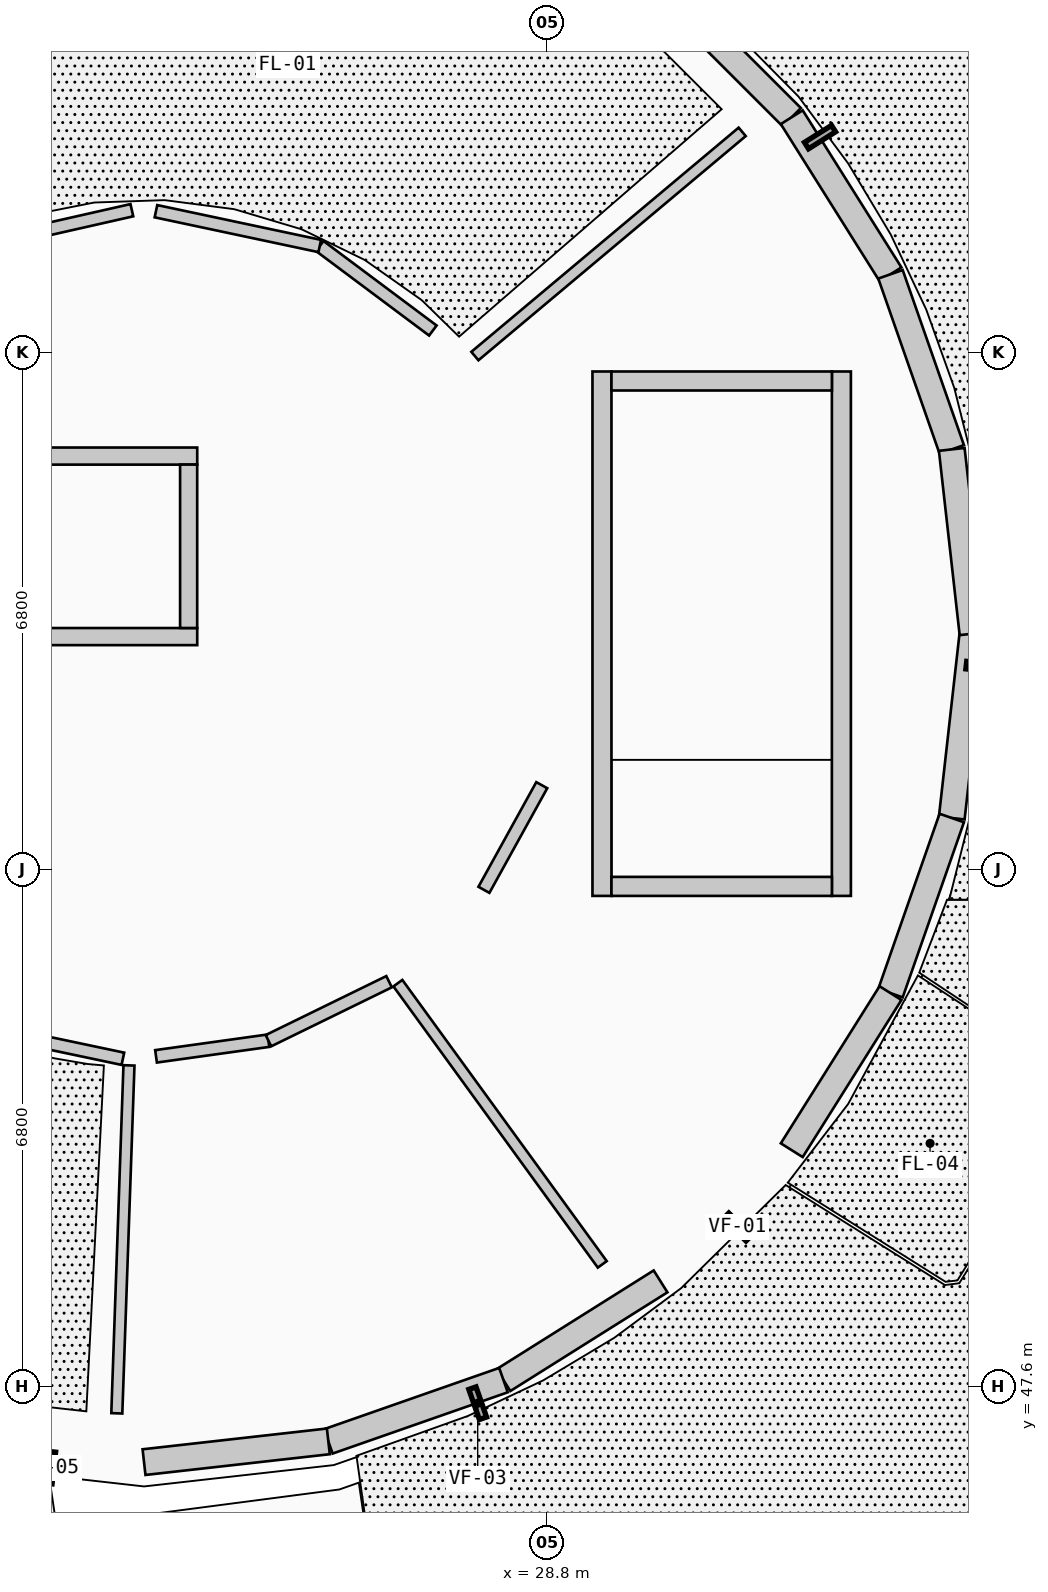
"""IFC4 building model, lengths in metres.
Left out: names, types, materials, properties, quantities, classifications, styles, units other than length and angle.
Written with IfcOpenShell. Run it as: python <this file> out.ifc"""

import sys

from ifc_helpers import new_model, si_unit, direction, frame, frame_2d, origin, origin_2d, place, context, subcontext, project, spatial, rectangle, circle, extrude, element, fill, save


model = new_model("IFC4")
c1 = context("Model", 3, precision=1e-05, world=origin(), true_north=direction((0.0, 1.0)))
c2 = subcontext(c1, "Body", "Model", "MODEL_VIEW")
j1 = project(units=[si_unit("LENGTHUNIT", "METRE"), si_unit("PLANEANGLEUNIT", "RADIAN")], contexts=[c1])
p1 = place(None, origin())
s1 = spatial("IfcSite", under=j1, at=p1, CompositionType="ELEMENT")
p2 = place(p1, origin())
s2 = spatial("IfcBuilding", under=s1, at=p2, CompositionType="ELEMENT")
p3 = place(p2, origin())
s3 = spatial("IfcBuildingStorey", under=s2, at=p3, CompositionType="ELEMENT", Elevation=0.0)
for number, where, z_axis, x_axis in (
    (1, (33.88, 57.5, 0.0), (0.0, 0.0, 1.0), (1.0, 0.0, 0.0)),
    (2, (32.852, 62.004, 0.0), (0.0, 0.0, 1.0), (1.0, 0.0, 0.0)),
    (3, (25.81, 47.38, 0.0), (0.0, 0.0, 1.0), (1.0, 0.0, 0.0)),
    (4, (29.972, 49.385, 0.0), (0.0, 0.0, 1.0), (1.0, 0.0, 0.0)),
    (5, (32.852, 52.996, 0.0), (0.0, 0.0, 1.0), (1.0, 0.0, 0.0)),
):
    element("IfcColumn", number, at=place(p3, frame(where, z_axis=z_axis, x_axis=x_axis)), inside=s3, PredefinedType="PILASTER", context=c2, shape_type="SweptSolid", body=[
        extrude(circle(Radius=0.275, at=origin_2d()), origin(), (0.0, 0.0, 1.0), 4.55),
    ])
for number, where, z_axis, x_axis in (
    (6, (27.46, 61.46, 0.0), (0.0, 0.0, 1.0), (1.0, 0.0, 0.0)),
    (7, (23.5, 63.1, 0.0), (0.0, 0.0, 1.0), (1.0, 0.0, 0.0)),
    (8, (23.5, 51.9, 0.0), (0.0, 0.0, 1.0), (1.0, 0.0, 0.0)),
    (9, (27.46, 53.54, 0.0), (0.0, 0.0, 1.0), (1.0, 0.0, 0.0)),
):
    element("IfcColumn", number, at=place(p3, frame(where, z_axis=z_axis, x_axis=x_axis)), inside=s3, PredefinedType="COLUMN", context=c2, shape_type="SweptSolid", body=[
        extrude(rectangle(XDim=0.315, YDim=0.315, at=origin_2d()), origin(), (0.0, 0.0, 1.0), 4.55),
    ])
p4 = place(p3, frame((26.15, 46.154, 0.0), z_axis=(0.0, 0.0, 1.0), x_axis=(1.0, 0.0, 0.0)))
e10 = element("IfcColumn", 10, at=p4, inside=s3, PredefinedType="PILASTER", context=c2, shape_type="SweptSolid", body=[
    extrude(circle(Radius=0.275, at=origin_2d()), origin(), (0.0, 0.0, 1.0), 4.55),
])
p5 = place(p3, frame((31.387, 47.61, 1.15), z_axis=(0.0, 0.0, 1.0), x_axis=(1.0, 0.0, 0.0)))
e11 = element("IfcColumn", 11, at=p5, inside=s3, PredefinedType="PILASTER", context=c2, shape_type="SweptSolid", body=[
    extrude(circle(Radius=0.19, at=origin_2d()), origin(), (0.0, 0.0, 1.0), 3.4),
])
p6 = place(p3, frame((34.4, 57.5, 0.0), z_axis=(0.0, 0.0, 1.0), x_axis=(-0.111847873866, -0.993725340882, 0.0)))
e12 = element("IfcWall", 12, at=p6, inside=s3, PredefinedType="SOLIDWALL", context=c2, shape_type="SweptSolid", body=[
    extrude(rectangle(XDim=2.44, YDim=0.34, at=frame_2d((1.22, 0.0))), origin(), (0.0, 0.0, 1.0), 3.659),
])
p7 = place(p3, frame((34.127, 55.075, 0.0), z_axis=(0.0, 0.0, 1.0), x_axis=(-0.330176659411, -0.943919156274, 0.0)))
e13 = element("IfcWall", 13, at=p7, inside=s3, PredefinedType="SOLIDWALL", context=c2, shape_type="SweptSolid", body=[
    extrude(rectangle(XDim=2.441, YDim=0.34, at=frame_2d((1.22, 0.0))), origin(), (0.0, 0.0, 1.0), 3.659),
])
p8 = place(p3, frame((33.321, 52.771, 0.0), z_axis=(0.0, 0.0, 1.0), x_axis=(-0.532136726684, -0.846658434148, 0.0)))
e14 = element("IfcWall", 14, at=p8, inside=s3, PredefinedType="SOLIDWALL", context=c2, shape_type="SweptSolid", body=[
    extrude(rectangle(XDim=2.441, YDim=0.34, at=frame_2d((1.221, 0.0))), origin(), (0.0, 0.0, 1.0), 3.659),
])
p9 = place(p8, frame((0.521, 0.0, 0.0)))
e15 = element("IfcOpeningElement", 15, at=p9, cuts=e14, PredefinedType="OPENING", context=c2, shape_type="SweptSolid", body=[
    extrude(rectangle(XDim=1.4, YDim=2.3, at=frame_2d((0.7, 1.15))), frame((0.0, 0.18, 0.0), z_axis=(0.0, -1.0, 0.0), x_axis=(1.0, 0.0, 0.0)), (0.0, 0.0, 1.0), 0.36),
])
p10 = place(p3, frame((30.296, 48.978, 0.0), z_axis=(0.0, 0.0, 1.0), x_axis=(-0.846658434148, -0.532136726684, 0.0)))
e16 = element("IfcWall", 16, at=p10, inside=s3, PredefinedType="SOLIDWALL", context=c2, shape_type="SweptSolid", body=[
    extrude(rectangle(XDim=2.441, YDim=0.34, at=frame_2d((1.221, 0.0))), origin(), (0.0, 0.0, 1.0), 3.659),
])
p11 = place(p3, frame((28.229, 47.679, 0.0), z_axis=(0.0, 0.0, 1.0), x_axis=(-0.943919156274, -0.330176659411, 0.0)))
e17 = element("IfcWall", 17, at=p11, inside=s3, PredefinedType="SOLIDWALL", context=c2, shape_type="SweptSolid", body=[
    extrude(rectangle(XDim=2.441, YDim=0.34, at=frame_2d((1.22, 0.0))), origin(), (0.0, 0.0, 1.0), 3.659),
])
p12 = place(p3, frame((25.925, 46.873, 0.0), z_axis=(0.0, 0.0, 1.0), x_axis=(-0.993725340882, -0.111847873866, 0.0)))
e18 = element("IfcWall", 18, at=p12, inside=s3, PredefinedType="SOLIDWALL", context=c2, shape_type="SweptSolid", body=[
    extrude(rectangle(XDim=2.44, YDim=0.34, at=frame_2d((1.22, 0.0))), origin(), (0.0, 0.0, 1.0), 3.659),
])
p13 = place(p3, frame((30.296, 66.022, 0.0), z_axis=(0.0, 0.0, 1.0), x_axis=(0.707106781187, -0.707106781187, 0.0)))
e19 = element("IfcWall", 19, at=p13, inside=s3, PredefinedType="SOLIDWALL", context=c2, shape_type="SweptSolid", body=[
    extrude(rectangle(XDim=2.441, YDim=0.34, at=frame_2d((1.22, 0.0))), origin(), (0.0, 0.0, 1.0), 3.659),
])
p14 = place(p3, frame((32.022, 64.296, 0.0), z_axis=(0.0, 0.0, 1.0), x_axis=(0.532136726684, -0.846658434148, 0.0)))
e20 = element("IfcWall", 20, at=p14, inside=s3, PredefinedType="SOLIDWALL", context=c2, shape_type="SweptSolid", body=[
    extrude(rectangle(XDim=2.441, YDim=0.34, at=frame_2d((1.221, 0.0))), origin(), (0.0, 0.0, 1.0), 3.659),
])
p15 = place(p3, frame((33.321, 62.229, 0.0), z_axis=(0.0, 0.0, 1.0), x_axis=(0.330176659411, -0.943919156274, 0.0)))
e21 = element("IfcWall", 21, at=p15, inside=s3, PredefinedType="SOLIDWALL", context=c2, shape_type="SweptSolid", body=[
    extrude(rectangle(XDim=2.441, YDim=0.34, at=frame_2d((1.22, 0.0))), origin(), (0.0, 0.0, 1.0), 3.659),
])
p16 = place(p3, frame((34.127, 59.925, 0.0), z_axis=(0.0, 0.0, 1.0), x_axis=(0.111847873866, -0.993725340882, 0.0)))
e22 = element("IfcWall", 22, at=p16, inside=s3, PredefinedType="SOLIDWALL", context=c2, shape_type="SweptSolid", body=[
    extrude(rectangle(XDim=2.44, YDim=0.34, at=frame_2d((1.22, 0.0))), origin(), (0.0, 0.0, 1.0), 3.659),
])
p17 = place(p2, frame((0.0, 0.0, -4.55)))
s4 = spatial("IfcBuildingStorey", under=s2, at=p17, CompositionType="ELEMENT", Elevation=-4.55)
p18 = place(p17, frame((33.906, 54.0, 0.0), z_axis=(0.0, 0.0, 1.0), x_axis=(1.0, 0.0, 0.0)))
e23 = element("IfcWall", 23, at=p18, inside=s4, PredefinedType="USERDEFINED", context=c2, shape_type="SweptSolid", body=[
    extrude(rectangle(XDim=5.27, YDim=0.4, at=frame_2d((2.635, 0.0))), origin(), (0.0, 0.0, 1.0), 6.68),
])
p19 = place(p3, frame((29.525, 60.95, 0.0), z_axis=(0.0, 0.0, 1.0), x_axis=(0.0, -1.0, 0.0)))
e24 = element("IfcWall", 24, at=p19, inside=s3, PredefinedType="SHEAR", context=c2, shape_type="SweptSolid", body=[
    extrude(rectangle(XDim=6.9, YDim=0.25, at=frame_2d((3.45, 0.0))), origin(), (0.0, 0.0, 1.0), 4.305),
])
p20 = place(p19, frame((0.43, 0.0, 0.0)))
e25 = element("IfcOpeningElement", 25, at=p20, cuts=e24, PredefinedType="OPENING", context=c2, shape_type="SweptSolid", body=[
    extrude(rectangle(XDim=1.1, YDim=2.15, at=frame_2d((0.55, 1.075))), frame((0.0, 0.135, 0.0), z_axis=(0.0, -1.0, 0.0), x_axis=(1.0, 0.0, 0.0)), (0.0, 0.0, 1.0), 0.27),
])
p21 = place(p3, frame((32.675, 60.95, 0.0), z_axis=(0.0, 0.0, 1.0), x_axis=(0.0, -1.0, 0.0)))
e26 = element("IfcWall", 26, at=p21, inside=s3, PredefinedType="SHEAR", context=c2, shape_type="SweptSolid", body=[
    extrude(rectangle(XDim=6.9, YDim=0.25, at=frame_2d((3.45, 0.0))), origin(), (0.0, 0.0, 1.0), 4.305),
])
for number, where, z_axis, x_axis in (
    (27, (29.65, 60.825, 0.0), (0.0, 0.0, 1.0), (1.0, 0.0, 0.0)),
    (28, (29.65, 54.175, 0.0), (0.0, 0.0, 1.0), (1.0, 0.0, 0.0)),
):
    element("IfcWall", number, at=place(p3, frame(where, z_axis=z_axis, x_axis=x_axis)), inside=s3, PredefinedType="SHEAR", context=c2, shape_type="SweptSolid", body=[
        extrude(rectangle(XDim=2.9, YDim=0.25, at=frame_2d((1.45, 0.0))), origin(), (0.0, 0.0, 1.0), 4.305),
    ])
p22 = place(p3, frame((21.1, 57.462, 0.0), z_axis=(0.0, 0.0, 1.0), x_axis=(1.0, 0.0, 0.0)))
e29 = element("IfcWall", 29, at=p22, inside=s3, PredefinedType="SHEAR", context=c2, shape_type="SweptSolid", body=[
    extrude(rectangle(XDim=3.1, YDim=0.225, at=frame_2d((1.55, 0.0))), origin(), (0.0, 0.0, 1.0), 4.305),
])
p23 = place(p22, frame((0.95, 0.0, 0.0)))
e30 = element("IfcOpeningElement", 30, at=p23, cuts=e29, PredefinedType="OPENING", context=c2, shape_type="SweptSolid", body=[
    extrude(rectangle(XDim=1.2, YDim=2.2, at=frame_2d((0.6, 1.1))), frame((0.0, 0.123, 0.0), z_axis=(0.0, -1.0, 0.0), x_axis=(1.0, 0.0, 0.0)), (0.0, 0.0, 1.0), 0.245),
])
p24 = place(p3, frame((21.1, 59.837, 0.0), z_axis=(0.0, 0.0, 1.0), x_axis=(1.0, 0.0, 0.0)))
e31 = element("IfcWall", 31, at=p24, inside=s3, PredefinedType="SHEAR", context=c2, shape_type="SweptSolid", body=[
    extrude(rectangle(XDim=3.1, YDim=0.225, at=frame_2d((1.55, 0.0))), origin(), (0.0, 0.0, 1.0), 4.305),
])
p25 = place(p3, frame((24.087, 57.575, 0.0), z_axis=(0.0, 0.0, 1.0), x_axis=(0.0, 1.0, 0.0)))
e32 = element("IfcWall", 32, at=p25, inside=s3, PredefinedType="SHEAR", context=c2, shape_type="SweptSolid", body=[
    extrude(rectangle(XDim=2.15, YDim=0.225, at=frame_2d((1.075, 0.0))), origin(), (0.0, 0.0, 1.0), 4.305),
])
p26 = place(p3, frame((27.853, 61.153, 0.0), z_axis=(0.0, 0.0, 1.0), x_axis=(0.766177182771, 0.64262938355, 0.0)))
e33 = element("IfcWall", 33, at=p26, inside=s3, PredefinedType="PARTITIONING", context=c2, shape_type="SweptSolid", body=[
    extrude(rectangle(XDim=4.59, YDim=0.145, at=frame_2d((2.295, 0.0))), origin(), (0.0, 0.0, 1.0), 3.634),
])
p27 = place(p3, frame((23.302, 51.82, 0.0), z_axis=(0.0, 0.0, 1.0), x_axis=(-0.034908318573, -0.999390518914, 0.0)))
e34 = element("IfcWall", 34, at=p27, inside=s3, PredefinedType="PARTITIONING", context=c2, shape_type="SweptSolid", body=[
    extrude(rectangle(XDim=4.581, YDim=0.145, at=frame_2d((2.291, 0.0))), origin(), (0.0, 0.0, 1.0), 3.634),
])
p28 = place(p3, frame((26.84, 52.902, 0.0), z_axis=(0.0, 0.0, 1.0), x_axis=(0.587873334136, -0.808952991843, 0.0)))
e35 = element("IfcWall", 35, at=p28, inside=s3, PredefinedType="PARTITIONING", context=c2, shape_type="SweptSolid", body=[
    extrude(rectangle(XDim=4.574, YDim=0.145, at=frame_2d((2.287, 0.0))), origin(), (0.0, 0.0, 1.0), 3.634),
])
p29 = place(p3, frame((27.3, 61.489, 0.0), z_axis=(0.0, 0.0, 1.0), x_axis=(-0.801023932766, 0.598632323831, 0.0)))
e36 = element("IfcWall", 36, at=p29, inside=s3, PredefinedType="PARTITIONING", context=c2, shape_type="SweptSolid", body=[
    extrude(rectangle(XDim=1.858, YDim=0.165, at=frame_2d((0.929, 0.0))), origin(), (0.0, 0.0, 1.0), 3.634),
])
p30 = place(p29, frame((0.289, 0.0, 0.0)))
e37 = element("IfcOpeningElement", 37, at=p30, cuts=e36, PredefinedType="OPENING", context=c2, shape_type="SweptSolid", body=[
    extrude(rectangle(XDim=1.28, YDim=2.3, at=frame_2d((0.64, 1.15))), frame((0.0, 0.093, 0.0), z_axis=(0.0, -1.0, 0.0), x_axis=(1.0, 0.0, 0.0)), (0.0, 0.0, 1.0), 0.185),
])
p31 = place(p3, frame((25.812, 62.601, 0.0), z_axis=(0.0, 0.0, 1.0), x_axis=(-0.978152936259, 0.207886587563, 0.0)))
e38 = element("IfcWall", 38, at=p31, inside=s3, PredefinedType="PARTITIONING", context=c2, shape_type="SweptSolid", body=[
    extrude(rectangle(XDim=2.203, YDim=0.165, at=frame_2d((1.102, 0.0))), origin(), (0.0, 0.0, 1.0), 3.634),
])
p32 = place(p3, frame((23.34, 63.072, 0.0), z_axis=(0.0, 0.0, 1.0), x_axis=(-0.975285396453, -0.2209488526, 0.0)))
e39 = element("IfcWall", 39, at=p32, inside=s3, PredefinedType="PARTITIONING", context=c2, shape_type="SweptSolid", body=[
    extrude(rectangle(XDim=2.276, YDim=0.165, at=frame_2d((1.138, 0.0))), origin(), (0.0, 0.0, 1.0), 3.634),
])
p33 = place(p3, frame((21.493, 52.272, 0.0), z_axis=(0.0, 0.0, 1.0), x_axis=(0.978436766116, -0.206546592113, 0.0)))
e40 = element("IfcWall", 40, at=p33, inside=s3, PredefinedType="PARTITIONING", context=c2, shape_type="SweptSolid", body=[
    extrude(rectangle(XDim=1.767, YDim=0.165, at=frame_2d((0.884, 0.0))), origin(), (0.0, 0.0, 1.0), 3.634),
])
p34 = place(p3, frame((23.658, 51.939, 0.0), z_axis=(0.0, 0.0, 1.0), x_axis=(0.99043401567, 0.137987175508, 0.0)))
e41 = element("IfcWall", 41, at=p34, inside=s3, PredefinedType="PARTITIONING", context=c2, shape_type="SweptSolid", body=[
    extrude(rectangle(XDim=1.493, YDim=0.165, at=frame_2d((0.747, 0.0))), origin(), (0.0, 0.0, 1.0), 3.634),
])
p35 = place(p34, frame((0.247, 0.0, 0.0)))
e42 = element("IfcOpeningElement", 42, at=p35, cuts=e41, PredefinedType="OPENING", context=c2, shape_type="SweptSolid", body=[
    extrude(rectangle(XDim=1.0, YDim=2.14, at=frame_2d((0.5, 1.07))), frame((0.0, 0.093, 0.0), z_axis=(0.0, -1.0, 0.0), x_axis=(1.0, 0.0, 0.0)), (0.0, 0.0, 1.0), 0.185),
])
p36 = place(p3, frame((25.137, 52.145, 0.0), z_axis=(0.0, 0.0, 1.0), x_axis=(0.898398901361, 0.439180388944, 0.0)))
e43 = element("IfcWall", 43, at=p36, inside=s3, PredefinedType="PARTITIONING", context=c2, shape_type="SweptSolid", body=[
    extrude(rectangle(XDim=1.767, YDim=0.165, at=frame_2d((0.883, 0.0))), origin(), (0.0, 0.0, 1.0), 3.634),
])
p37 = place(p3, frame((27.972, 54.13, 0.0), z_axis=(0.0, 0.0, 1.0), x_axis=(0.483639192056, 0.875267463069, 0.0)))
e44 = element("IfcWall", 44, at=p37, inside=s3, PredefinedType="PARTITIONING", context=c2, shape_type="SweptSolid", body=[
    extrude(rectangle(XDim=1.573, YDim=0.165, at=frame_2d((0.787, 0.0))), origin(), (0.0, 0.0, 1.0), 3.634),
])
p38 = place(p37, frame((0.267, 0.0, 0.0)))
e45 = element("IfcOpeningElement", 45, at=p38, cuts=e44, PredefinedType="OPENING", context=c2, shape_type="SweptSolid", body=[
    extrude(rectangle(XDim=1.04, YDim=2.14, at=frame_2d((0.52, 1.07))), frame((0.0, 0.093, 0.0), z_axis=(0.0, -1.0, 0.0), x_axis=(1.0, 0.0, 0.0)), (0.0, 0.0, 1.0), 0.185),
])
p39 = place(p9, origin())
e46 = element("IfcDoor", 46, at=p39, inside=s3, OperationType="SINGLE_SWING_LEFT", PredefinedType="DOOR", context=c2, shape_type="SweptSolid", body=[
    extrude(rectangle(XDim=1.4, YDim=2.3, at=frame_2d((0.7, 1.15))), frame((0.0, 0.025, 0.0), z_axis=(0.0, -1.0, 0.0), x_axis=(1.0, 0.0, 0.0)), (0.0, 0.0, 1.0), 0.05),
])
fill(e15, e46)
p40 = place(p20, origin())
e47 = element("IfcDoor", 47, at=p40, inside=s3, OperationType="SINGLE_SWING_RIGHT", PredefinedType="DOOR", context=c2, shape_type="SweptSolid", body=[
    extrude(rectangle(XDim=1.1, YDim=2.15, at=frame_2d((0.55, 1.075))), frame((0.0, 0.025, 0.0), z_axis=(0.0, -1.0, 0.0), x_axis=(1.0, 0.0, 0.0)), (0.0, 0.0, 1.0), 0.05),
])
fill(e25, e47)
p41 = place(p23, origin())
e48 = element("IfcDoor", 48, at=p41, inside=s3, OperationType="DOUBLE_DOOR_SLIDING", PredefinedType="DOOR", context=c2, shape_type="SweptSolid", body=[
    extrude(rectangle(XDim=1.2, YDim=2.2, at=frame_2d((0.6, 1.1))), frame((0.0, 0.025, 0.0), z_axis=(0.0, -1.0, 0.0), x_axis=(1.0, 0.0, 0.0)), (0.0, 0.0, 1.0), 0.05),
])
fill(e30, e48)
p42 = place(p30, origin())
e49 = element("IfcDoor", 49, at=p42, inside=s3, OperationType="SINGLE_SWING_LEFT", PredefinedType="DOOR", context=c2, shape_type="SweptSolid", body=[
    extrude(rectangle(XDim=1.28, YDim=2.3, at=frame_2d((0.64, 1.15))), frame((0.0, 0.025, 0.0), z_axis=(0.0, -1.0, 0.0), x_axis=(1.0, 0.0, 0.0)), (0.0, 0.0, 1.0), 0.05),
])
fill(e37, e49)
p43 = place(p35, origin())
e50 = element("IfcDoor", 50, at=p43, inside=s3, OperationType="SINGLE_SWING_RIGHT", PredefinedType="DOOR", context=c2, shape_type="SweptSolid", body=[
    extrude(rectangle(XDim=1.0, YDim=2.14, at=frame_2d((0.5, 1.07))), frame((0.0, 0.025, 0.0), z_axis=(0.0, -1.0, 0.0), x_axis=(1.0, 0.0, 0.0)), (0.0, 0.0, 1.0), 0.05),
])
fill(e42, e50)
p44 = place(p38, origin())
e51 = element("IfcDoor", 51, at=p44, inside=s3, OperationType="SINGLE_SWING_LEFT", PredefinedType="DOOR", context=c2, shape_type="SweptSolid", body=[
    extrude(rectangle(XDim=1.04, YDim=2.14, at=frame_2d((0.52, 1.07))), frame((0.0, 0.025, 0.0), z_axis=(0.0, -1.0, 0.0), x_axis=(1.0, 0.0, 0.0)), (0.0, 0.0, 1.0), 0.05),
])
fill(e45, e51)
save(model, sys.argv[1])
